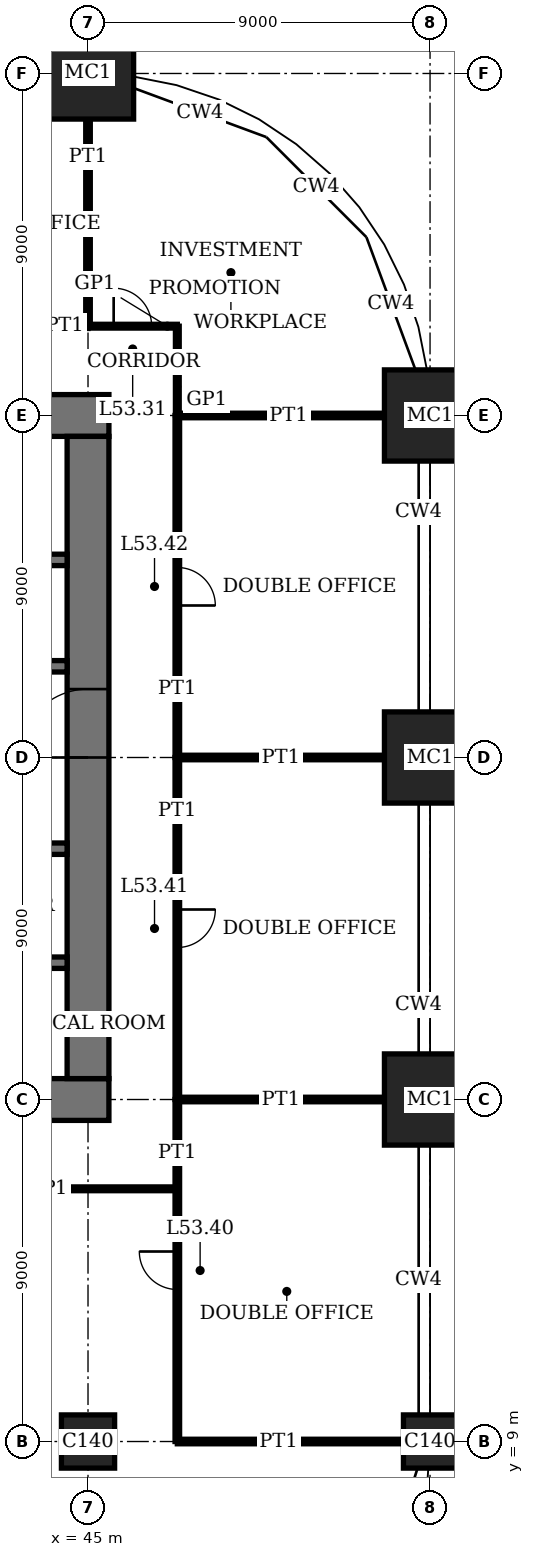
"""IFC4 building model, lengths in metres.
Left out: names, types, materials, properties, quantities, classifications, styles, units other than length and angle.
Written with IfcOpenShell. Run it as: python <this file> out.ifc"""

import sys

from ifc_helpers import new_model, si_unit, direction, frame, frame_2d, origin, origin_2d, place, context, subcontext, project, spatial, rectangle, extrude, element, fill, save


model = new_model("IFC4")
c1 = context("Model", 3, precision=1e-05, world=origin(), true_north=direction((0.0, 1.0)))
c2 = subcontext(c1, "Body", "Model", "MODEL_VIEW")
j1 = project(units=[si_unit("LENGTHUNIT", "METRE"), si_unit("PLANEANGLEUNIT", "RADIAN")], contexts=[c1])
p1 = place(None, origin())
s1 = spatial("IfcSite", under=j1, at=p1, CompositionType="ELEMENT")
p2 = place(p1, origin())
s2 = spatial("IfcBuilding", under=s1, at=p2, CompositionType="ELEMENT")
p3 = place(p2, frame((0.0, 0.0, 218.2)))
s3 = spatial("IfcBuildingStorey", under=s2, at=p3, CompositionType="ELEMENT", Elevation=218.2)
p4 = place(p3, frame((45.0, 9.0, 0.0), z_axis=(0.0, 0.0, 1.0), x_axis=(1.0, 0.0, 0.0)))
e1 = element("IfcColumn", 1, at=p4, inside=s3, PredefinedType="COLUMN", context=c2, shape_type="SweptSolid", body=[
    extrude(rectangle(XDim=1.4, YDim=1.4, at=origin_2d()), origin(), (0.0, 0.0, 1.0), 4.0),
])
p5 = place(p3, frame((45.0, 45.0, 0.0), z_axis=(0.0, 0.0, 1.0), x_axis=(1.0, 0.0, 0.0)))
e2 = element("IfcColumn", 2, at=p5, inside=s3, PredefinedType="COLUMN", context=c2, shape_type="SweptSolid", body=[
    extrude(rectangle(XDim=2.4, YDim=2.4, at=origin_2d()), origin(), (0.0, 0.0, 1.0), 4.0),
])
p6 = place(p3, frame((54.0, 9.0, 0.0), z_axis=(0.0, 0.0, 1.0), x_axis=(1.0, 0.0, 0.0)))
e3 = element("IfcColumn", 3, at=p6, inside=s3, PredefinedType="COLUMN", context=c2, shape_type="SweptSolid", body=[
    extrude(rectangle(XDim=1.4, YDim=1.4, at=origin_2d()), origin(), (0.0, 0.0, 1.0), 4.0),
])
for number, where, z_axis, x_axis in (
    (4, (54.0, 18.0, 0.0), (0.0, 0.0, 1.0), (1.0, 0.0, 0.0)),
    (5, (54.0, 27.0, 0.0), (0.0, 0.0, 1.0), (1.0, 0.0, 0.0)),
    (6, (54.0, 36.0, 0.0), (0.0, 0.0, 1.0), (1.0, 0.0, 0.0)),
):
    element("IfcColumn", number, at=place(p3, frame(where, z_axis=z_axis, x_axis=x_axis)), inside=s3, PredefinedType="COLUMN", context=c2, shape_type="SweptSolid", body=[
        extrude(rectangle(XDim=2.4, YDim=2.4, at=origin_2d()), origin(), (0.0, 0.0, 1.0), 4.0),
    ])
p7 = place(p3, frame((17.45, 18.0, 0.0), z_axis=(0.0, 0.0, 1.0), x_axis=(1.0, 0.0, 0.0)))
e7 = element("IfcWall", 7, at=p7, inside=s3, PredefinedType="SHEAR", context=c2, shape_type="SweptSolid", body=[
    extrude(rectangle(XDim=28.1, YDim=1.1, at=frame_2d((14.05, 0.0))), origin(), (0.0, 0.0, 1.0), 4.0),
])
p8 = place(p7, frame((11.55, 0.0, 0.0)))
e8 = element("IfcOpeningElement", 8, at=p8, cuts=e7, PredefinedType="OPENING", context=c2, shape_type="SweptSolid", body=[
    extrude(rectangle(XDim=1.0, YDim=2.4, at=frame_2d((0.5, 1.2))), frame((0.0, 0.56, 0.0), z_axis=(0.0, -1.0, 0.0), x_axis=(1.0, 0.0, 0.0)), (0.0, 0.0, 1.0), 1.12),
])
p9 = place(p7, frame((16.55, 0.0, 0.0)))
e9 = element("IfcOpeningElement", 9, at=p9, cuts=e7, PredefinedType="OPENING", context=c2, shape_type="SweptSolid", body=[
    extrude(rectangle(XDim=1.0, YDim=2.4, at=frame_2d((0.5, 1.2))), frame((0.0, 0.56, 0.0), z_axis=(0.0, -1.0, 0.0), x_axis=(1.0, 0.0, 0.0)), (0.0, 0.0, 1.0), 1.12),
])
p10 = place(p7, frame((20.0, 0.0, 0.0)))
e10 = element("IfcOpeningElement", 10, at=p10, cuts=e7, PredefinedType="OPENING", context=c2, shape_type="SweptSolid", body=[
    extrude(rectangle(XDim=1.1, YDim=2.4, at=frame_2d((0.55, 1.2))), frame((0.0, 0.56, 0.0), z_axis=(0.0, -1.0, 0.0), x_axis=(1.0, 0.0, 0.0)), (0.0, 0.0, 1.0), 1.12),
])
p11 = place(p7, frame((24.05, 0.0, 0.0)))
e11 = element("IfcOpeningElement", 11, at=p11, cuts=e7, PredefinedType="OPENING", context=c2, shape_type="SweptSolid", body=[
    extrude(rectangle(XDim=1.0, YDim=2.4, at=frame_2d((0.5, 1.2))), frame((0.0, 0.56, 0.0), z_axis=(0.0, -1.0, 0.0), x_axis=(1.0, 0.0, 0.0)), (0.0, 0.0, 1.0), 1.12),
])
p12 = place(p3, frame((45.55, 36.0, 0.0), z_axis=(0.0, 0.0, 1.0), x_axis=(-1.0, 0.0, 0.0)))
e12 = element("IfcWall", 12, at=p12, inside=s3, PredefinedType="SHEAR", context=c2, shape_type="SweptSolid", body=[
    extrude(rectangle(XDim=28.1, YDim=1.1, at=frame_2d((14.05, 0.0))), origin(), (0.0, 0.0, 1.0), 4.0),
])
p13 = place(p12, frame((11.55, 0.0, 0.0)))
e13 = element("IfcOpeningElement", 13, at=p13, cuts=e12, PredefinedType="OPENING", context=c2, shape_type="SweptSolid", body=[
    extrude(rectangle(XDim=1.0, YDim=2.4, at=frame_2d((0.5, 1.2))), frame((0.0, 0.56, 0.0), z_axis=(0.0, -1.0, 0.0), x_axis=(1.0, 0.0, 0.0)), (0.0, 0.0, 1.0), 1.12),
])
p14 = place(p12, frame((16.55, 0.0, 0.0)))
e14 = element("IfcOpeningElement", 14, at=p14, cuts=e12, PredefinedType="OPENING", context=c2, shape_type="SweptSolid", body=[
    extrude(rectangle(XDim=1.0, YDim=2.4, at=frame_2d((0.5, 1.2))), frame((0.0, 0.56, 0.0), z_axis=(0.0, -1.0, 0.0), x_axis=(1.0, 0.0, 0.0)), (0.0, 0.0, 1.0), 1.12),
])
p15 = place(p12, frame((20.0, 0.0, 0.0)))
e15 = element("IfcOpeningElement", 15, at=p15, cuts=e12, PredefinedType="OPENING", context=c2, shape_type="SweptSolid", body=[
    extrude(rectangle(XDim=1.1, YDim=2.4, at=frame_2d((0.55, 1.2))), frame((0.0, 0.56, 0.0), z_axis=(0.0, -1.0, 0.0), x_axis=(1.0, 0.0, 0.0)), (0.0, 0.0, 1.0), 1.12),
])
p16 = place(p12, frame((24.05, 0.0, 0.0)))
e16 = element("IfcOpeningElement", 16, at=p16, cuts=e12, PredefinedType="OPENING", context=c2, shape_type="SweptSolid", body=[
    extrude(rectangle(XDim=1.0, YDim=2.4, at=frame_2d((0.5, 1.2))), frame((0.0, 0.56, 0.0), z_axis=(0.0, -1.0, 0.0), x_axis=(1.0, 0.0, 0.0)), (0.0, 0.0, 1.0), 1.12),
])
p17 = place(p3, frame((45.0, 18.55, 0.0), z_axis=(0.0, 0.0, 1.0), x_axis=(0.0, 1.0, 0.0)))
e17 = element("IfcWall", 17, at=p17, inside=s3, PredefinedType="SHEAR", context=c2, shape_type="SweptSolid", body=[
    extrude(rectangle(XDim=16.9, YDim=1.1, at=frame_2d((8.45, 0.0))), origin(), (0.0, 0.0, 1.0), 4.0),
])
p18 = place(p17, frame((8.45, 0.0, 0.0)))
e18 = element("IfcOpeningElement", 18, at=p18, cuts=e17, PredefinedType="OPENING", context=c2, shape_type="SweptSolid", body=[
    extrude(rectangle(XDim=1.8, YDim=2.4, at=frame_2d((0.9, 1.2))), frame((0.0, 0.56, 0.0), z_axis=(0.0, -1.0, 0.0), x_axis=(1.0, 0.0, 0.0)), (0.0, 0.0, 1.0), 1.12),
])
p19 = place(p3, frame((36.15, 32.2, 0.0), z_axis=(0.0, 0.0, 1.0), x_axis=(1.0, 0.0, 0.0)))
e19 = element("IfcWall", 19, at=p19, inside=s3, PredefinedType="SHEAR", context=c2, shape_type="SweptSolid", body=[
    extrude(rectangle(XDim=8.3, YDim=0.3, at=frame_2d((4.15, 0.0))), origin(), (0.0, 0.0, 1.0), 4.0),
])
p20 = place(p19, frame((0.45, 0.0, 0.0)))
e20 = element("IfcOpeningElement", 20, at=p20, cuts=e19, PredefinedType="OPENING", context=c2, shape_type="SweptSolid", body=[
    extrude(rectangle(XDim=1.0, YDim=2.4, at=frame_2d((0.5, 1.2))), frame((0.0, 0.16, 0.0), z_axis=(0.0, -1.0, 0.0), x_axis=(1.0, 0.0, 0.0)), (0.0, 0.0, 1.0), 0.32),
])
p21 = place(p3, frame((18.55, 24.6, 0.0), z_axis=(0.0, 0.0, 1.0), x_axis=(1.0, 0.0, 0.0)))
e21 = element("IfcWall", 21, at=p21, inside=s3, PredefinedType="SHEAR", context=c2, shape_type="SweptSolid", body=[
    extrude(rectangle(XDim=25.9, YDim=0.3, at=frame_2d((12.95, 0.0))), origin(), (0.0, 0.0, 1.0), 4.0),
])
p22 = place(p21, frame((4.95, 0.0, 0.0)))
e22 = element("IfcOpeningElement", 22, at=p22, cuts=e21, PredefinedType="OPENING", context=c2, shape_type="SweptSolid", body=[
    extrude(rectangle(XDim=1.0, YDim=2.4, at=frame_2d((0.5, 1.2))), frame((0.0, 0.16, 0.0), z_axis=(0.0, -1.0, 0.0), x_axis=(1.0, 0.0, 0.0)), (0.0, 0.0, 1.0), 0.32),
])
p23 = place(p21, frame((24.5, 0.0, 0.0)))
e23 = element("IfcOpeningElement", 23, at=p23, cuts=e21, PredefinedType="OPENING", context=c2, shape_type="SweptSolid", body=[
    extrude(rectangle(XDim=0.9, YDim=2.1, at=frame_2d((0.45, 1.05))), frame((0.0, 0.16, 0.0), z_axis=(0.0, -1.0, 0.0), x_axis=(1.0, 0.0, 0.0)), (0.0, 0.0, 1.0), 0.32),
])
p24 = place(p21, frame((21.3, 0.0, 0.0)))
e24 = element("IfcOpeningElement", 24, at=p24, cuts=e21, PredefinedType="OPENING", context=c2, shape_type="SweptSolid", body=[
    extrude(rectangle(XDim=1.3, YDim=2.4, at=frame_2d((0.65, 1.2))), frame((0.0, 0.16, 0.0), z_axis=(0.0, -1.0, 0.0), x_axis=(1.0, 0.0, 0.0)), (0.0, 0.0, 1.0), 0.32),
])
p25 = place(p3, frame((18.55, 29.4, 0.0), z_axis=(0.0, 0.0, 1.0), x_axis=(1.0, 0.0, 0.0)))
e25 = element("IfcWall", 25, at=p25, inside=s3, PredefinedType="SHEAR", context=c2, shape_type="SweptSolid", body=[
    extrude(rectangle(XDim=25.9, YDim=0.3, at=frame_2d((12.95, 0.0))), origin(), (0.0, 0.0, 1.0), 4.0),
])
p26 = place(p25, frame((19.95, 0.0, 0.0)))
e26 = element("IfcOpeningElement", 26, at=p26, cuts=e25, PredefinedType="OPENING", context=c2, shape_type="SweptSolid", body=[
    extrude(rectangle(XDim=1.0, YDim=2.4, at=frame_2d((0.5, 1.2))), frame((0.0, 0.16, 0.0), z_axis=(0.0, -1.0, 0.0), x_axis=(1.0, 0.0, 0.0)), (0.0, 0.0, 1.0), 0.32),
])
p27 = place(p25, frame((0.5, 0.0, 0.0)))
e27 = element("IfcOpeningElement", 27, at=p27, cuts=e25, PredefinedType="OPENING", context=c2, shape_type="SweptSolid", body=[
    extrude(rectangle(XDim=0.9, YDim=2.1, at=frame_2d((0.45, 1.05))), frame((0.0, 0.16, 0.0), z_axis=(0.0, -1.0, 0.0), x_axis=(1.0, 0.0, 0.0)), (0.0, 0.0, 1.0), 0.32),
])
p28 = place(p25, frame((15.45, 0.0, 0.0)))
e28 = element("IfcOpeningElement", 28, at=p28, cuts=e25, PredefinedType="OPENING", context=c2, shape_type="SweptSolid", body=[
    extrude(rectangle(XDim=1.0, YDim=2.4, at=frame_2d((0.5, 1.2))), frame((0.0, 0.16, 0.0), z_axis=(0.0, -1.0, 0.0), x_axis=(1.0, 0.0, 0.0)), (0.0, 0.0, 1.0), 0.32),
])
p29 = place(p25, frame((12.45, 0.0, 0.0)))
e29 = element("IfcOpeningElement", 29, at=p29, cuts=e25, PredefinedType="OPENING", context=c2, shape_type="SweptSolid", body=[
    extrude(rectangle(XDim=1.0, YDim=2.4, at=frame_2d((0.5, 1.2))), frame((0.0, 0.16, 0.0), z_axis=(0.0, -1.0, 0.0), x_axis=(1.0, 0.0, 0.0)), (0.0, 0.0, 1.0), 0.32),
])
p30 = place(p25, frame((9.4, 0.0, 0.0)))
e30 = element("IfcOpeningElement", 30, at=p30, cuts=e25, PredefinedType="OPENING", context=c2, shape_type="SweptSolid", body=[
    extrude(rectangle(XDim=1.1, YDim=2.4, at=frame_2d((0.55, 1.2))), frame((0.0, 0.16, 0.0), z_axis=(0.0, -1.0, 0.0), x_axis=(1.0, 0.0, 0.0)), (0.0, 0.0, 1.0), 0.32),
])
p31 = place(p25, frame((6.4, 0.0, 0.0)))
e31 = element("IfcOpeningElement", 31, at=p31, cuts=e25, PredefinedType="OPENING", context=c2, shape_type="SweptSolid", body=[
    extrude(rectangle(XDim=1.1, YDim=2.4, at=frame_2d((0.55, 1.2))), frame((0.0, 0.16, 0.0), z_axis=(0.0, -1.0, 0.0), x_axis=(1.0, 0.0, 0.0)), (0.0, 0.0, 1.0), 0.32),
])
p32 = place(p25, frame((3.3, 0.0, 0.0)))
e32 = element("IfcOpeningElement", 32, at=p32, cuts=e25, PredefinedType="OPENING", context=c2, shape_type="SweptSolid", body=[
    extrude(rectangle(XDim=1.3, YDim=2.4, at=frame_2d((0.65, 1.2))), frame((0.0, 0.16, 0.0), z_axis=(0.0, -1.0, 0.0), x_axis=(1.0, 0.0, 0.0)), (0.0, 0.0, 1.0), 0.32),
])
p33 = place(p3, frame((27.15, 21.6, 0.0), z_axis=(0.0, 0.0, 1.0), x_axis=(1.0, 0.0, 0.0)))
e33 = element("IfcWall", 33, at=p33, inside=s3, PredefinedType="SHEAR", context=c2, shape_type="SweptSolid", body=[
    extrude(rectangle(XDim=17.3, YDim=0.3, at=frame_2d((8.65, 0.0))), origin(), (0.0, 0.0, 1.0), 4.0),
])
p34 = place(p3, frame((47.35, 9.0, 0.0), z_axis=(0.0, 0.0, 1.0), x_axis=(1.0, 0.0, 0.0)))
e34 = element("IfcWall", 34, at=p34, inside=s3, PredefinedType="PARTITIONING", context=c2, shape_type="SweptSolid", body=[
    extrude(rectangle(XDim=5.95, YDim=0.12, at=frame_2d((2.975, 0.0))), origin(), (0.0, 0.0, 1.0), 3.05),
])
p35 = place(p3, frame((40.5, 15.65, 0.0), z_axis=(0.0, 0.0, 1.0), x_axis=(1.0, 0.0, 0.0)))
e35 = element("IfcWall", 35, at=p35, inside=s3, PredefinedType="PARTITIONING", context=c2, shape_type="SweptSolid", body=[
    extrude(rectangle(XDim=6.85, YDim=0.1, at=frame_2d((3.425, 0.0))), origin(), (0.0, 0.0, 1.0), 3.75),
])
for number, where, z_axis, x_axis in (
    (36, (47.35, 18.0, 0.0), (0.0, 0.0, 1.0), (1.0, 0.0, 0.0)),
    (37, (47.35, 27.0, 0.0), (0.0, 0.0, 1.0), (1.0, 0.0, 0.0)),
    (38, (47.35, 36.0, 0.0), (0.0, 0.0, 1.0), (1.0, 0.0, 0.0)),
):
    element("IfcWall", number, at=place(p3, frame(where, z_axis=z_axis, x_axis=x_axis)), inside=s3, PredefinedType="PARTITIONING", context=c2, shape_type="SweptSolid", body=[
        extrude(rectangle(XDim=5.45, YDim=0.12, at=frame_2d((2.725, 0.0))), origin(), (0.0, 0.0, 1.0), 3.05),
    ])
p36 = place(p3, frame((40.5, 38.35, 0.0), z_axis=(0.0, 0.0, 1.0), x_axis=(1.0, 0.0, 0.0)))
e39 = element("IfcWall", 39, at=p36, inside=s3, PredefinedType="PARTITIONING", context=c2, shape_type="SweptSolid", body=[
    extrude(rectangle(XDim=4.5, YDim=0.12, at=frame_2d((2.25, 0.0))), origin(), (0.0, 0.0, 1.0), 3.75),
])
p37 = place(p36, frame((1.75, 0.0, 0.0)))
e40 = element("IfcOpeningElement", 40, at=p37, cuts=e39, PredefinedType="OPENING", context=c2, shape_type="SweptSolid", body=[
    extrude(rectangle(XDim=1.0, YDim=2.4, at=frame_2d((0.5, 1.2))), frame((0.0, 0.07, 0.0), z_axis=(0.0, -1.0, 0.0), x_axis=(1.0, 0.0, 0.0)), (0.0, 0.0, 1.0), 0.14),
])
p38 = place(p3, frame((45.0, 38.35, 0.0), z_axis=(0.0, 0.0, 1.0), x_axis=(1.0, 0.0, 0.0)))
e41 = element("IfcWall", 41, at=p38, inside=s3, PredefinedType="PARTITIONING", context=c2, shape_type="SweptSolid", body=[
    extrude(rectangle(XDim=2.35, YDim=0.1, at=frame_2d((1.175, 0.0))), origin(), (0.0, 0.0, 1.0), 3.75),
])
p39 = place(p38, frame((0.675, 0.0, 0.0)))
e42 = element("IfcOpeningElement", 42, at=p39, cuts=e41, PredefinedType="OPENING", context=c2, shape_type="SweptSolid", body=[
    extrude(rectangle(XDim=1.0, YDim=2.4, at=frame_2d((0.5, 1.2))), frame((0.0, 0.06, 0.0), z_axis=(0.0, -1.0, 0.0), x_axis=(1.0, 0.0, 0.0)), (0.0, 0.0, 1.0), 0.12),
])
p40 = place(p3, frame((45.0, 38.35, 0.0), z_axis=(0.0, 0.0, 1.0), x_axis=(0.0, 1.0, 0.0)))
e43 = element("IfcWall", 43, at=p40, inside=s3, PredefinedType="PARTITIONING", context=c2, shape_type="SweptSolid", body=[
    extrude(rectangle(XDim=5.45, YDim=0.12, at=frame_2d((2.725, 0.0))), origin(), (0.0, 0.0, 1.0), 3.05),
])
p41 = place(p3, frame((47.35, 9.0, 0.0), z_axis=(0.0, 0.0, 1.0), x_axis=(0.0, 1.0, 0.0)))
e44 = element("IfcWall", 44, at=p41, inside=s3, PredefinedType="PARTITIONING", context=c2, shape_type="SweptSolid", body=[
    extrude(rectangle(XDim=9.0, YDim=0.12, at=frame_2d((4.5, 0.0))), origin(), (0.0, 0.0, 1.0), 3.75),
])
p42 = place(p41, frame((4.0, 0.0, 0.0)))
e45 = element("IfcOpeningElement", 45, at=p42, cuts=e44, PredefinedType="OPENING", context=c2, shape_type="SweptSolid", body=[
    extrude(rectangle(XDim=1.0, YDim=2.4, at=frame_2d((0.5, 1.2))), frame((0.0, 0.07, 0.0), z_axis=(0.0, -1.0, 0.0), x_axis=(1.0, 0.0, 0.0)), (0.0, 0.0, 1.0), 0.14),
])
p43 = place(p3, frame((47.35, 18.0, 0.0), z_axis=(0.0, 0.0, 1.0), x_axis=(0.0, 1.0, 0.0)))
e46 = element("IfcWall", 46, at=p43, inside=s3, PredefinedType="PARTITIONING", context=c2, shape_type="SweptSolid", body=[
    extrude(rectangle(XDim=9.0, YDim=0.12, at=frame_2d((4.5, 0.0))), origin(), (0.0, 0.0, 1.0), 3.75),
])
p44 = place(p43, frame((4.0, 0.0, 0.0)))
e47 = element("IfcOpeningElement", 47, at=p44, cuts=e46, PredefinedType="OPENING", context=c2, shape_type="SweptSolid", body=[
    extrude(rectangle(XDim=1.0, YDim=2.4, at=frame_2d((0.5, 1.2))), frame((0.0, 0.07, 0.0), z_axis=(0.0, -1.0, 0.0), x_axis=(1.0, 0.0, 0.0)), (0.0, 0.0, 1.0), 0.14),
])
p45 = place(p3, frame((47.35, 27.0, 0.0), z_axis=(0.0, 0.0, 1.0), x_axis=(0.0, 1.0, 0.0)))
e48 = element("IfcWall", 48, at=p45, inside=s3, PredefinedType="PARTITIONING", context=c2, shape_type="SweptSolid", body=[
    extrude(rectangle(XDim=9.0, YDim=0.12, at=frame_2d((4.5, 0.0))), origin(), (0.0, 0.0, 1.0), 3.75),
])
p46 = place(p45, frame((4.0, 0.0, 0.0)))
e49 = element("IfcOpeningElement", 49, at=p46, cuts=e48, PredefinedType="OPENING", context=c2, shape_type="SweptSolid", body=[
    extrude(rectangle(XDim=1.0, YDim=2.4, at=frame_2d((0.5, 1.2))), frame((0.0, 0.07, 0.0), z_axis=(0.0, -1.0, 0.0), x_axis=(1.0, 0.0, 0.0)), (0.0, 0.0, 1.0), 0.14),
])
p47 = place(p3, frame((47.35, 36.0, 0.0), z_axis=(0.0, 0.0, 1.0), x_axis=(0.0, 1.0, 0.0)))
e50 = element("IfcWall", 50, at=p47, inside=s3, PredefinedType="PARTITIONING", context=c2, shape_type="SweptSolid", body=[
    extrude(rectangle(XDim=2.35, YDim=0.1, at=frame_2d((1.175, 0.0))), origin(), (0.0, 0.0, 1.0), 3.75),
])
p48 = place(p18, origin())
e51 = element("IfcDoor", 51, at=p48, inside=s3, OperationType="DOUBLE_DOOR_DOUBLE_SWING", PredefinedType="DOOR", context=c2, shape_type="SweptSolid", body=[
    extrude(rectangle(XDim=1.8, YDim=2.4, at=frame_2d((0.9, 1.2))), frame((0.0, 0.03, 0.0), z_axis=(0.0, -1.0, 0.0), x_axis=(1.0, 0.0, 0.0)), (0.0, 0.0, 1.0), 0.06),
    extrude(rectangle(XDim=0.04, YDim=2.4, at=frame_2d((0.02, 1.2))), frame((0.0, 0.55, 0.0), z_axis=(0.0, -1.0, 0.0), x_axis=(1.0, 0.0, 0.0)), (0.0, 0.0, 1.0), 1.1),
    extrude(rectangle(XDim=0.04, YDim=2.4, at=frame_2d((1.78, 1.2))), frame((0.0, 0.55, 0.0), z_axis=(0.0, -1.0, 0.0), x_axis=(1.0, 0.0, 0.0)), (0.0, 0.0, 1.0), 1.1),
    extrude(rectangle(XDim=1.8, YDim=0.04, at=frame_2d((0.9, 2.38))), frame((0.0, 0.55, 0.0), z_axis=(0.0, -1.0, 0.0), x_axis=(1.0, 0.0, 0.0)), (0.0, 0.0, 1.0), 1.1),
])
fill(e18, e51)
p49 = place(p39, origin())
e52 = element("IfcDoor", 52, at=p49, inside=s3, OperationType="SINGLE_SWING_RIGHT", PredefinedType="DOOR", context=c2, shape_type="SweptSolid", body=[
    extrude(rectangle(XDim=1.0, YDim=2.4, at=frame_2d((0.5, 1.2))), frame((0.0, 0.02, 0.0), z_axis=(0.0, -1.0, 0.0), x_axis=(1.0, 0.0, 0.0)), (0.0, 0.0, 1.0), 0.04),
])
fill(e42, e52)
p50 = place(p42, origin())
e53 = element("IfcDoor", 53, at=p50, inside=s3, OperationType="SINGLE_SWING_LEFT", PredefinedType="DOOR", context=c2, shape_type="SweptSolid", body=[
    extrude(rectangle(XDim=1.0, YDim=2.4, at=frame_2d((0.5, 1.2))), frame((0.0, 0.025, 0.0), z_axis=(0.0, -1.0, 0.0), x_axis=(1.0, 0.0, 0.0)), (0.0, 0.0, 1.0), 0.05),
])
fill(e45, e53)
p51 = place(p44, origin())
e54 = element("IfcDoor", 54, at=p51, inside=s3, OperationType="SINGLE_SWING_RIGHT", PredefinedType="DOOR", context=c2, shape_type="SweptSolid", body=[
    extrude(rectangle(XDim=1.0, YDim=2.4, at=frame_2d((0.5, 1.2))), frame((0.0, 0.025, 0.0), z_axis=(0.0, -1.0, 0.0), x_axis=(1.0, 0.0, 0.0)), (0.0, 0.0, 1.0), 0.05),
])
fill(e47, e54)
p52 = place(p46, origin())
e55 = element("IfcDoor", 55, at=p52, inside=s3, OperationType="SINGLE_SWING_LEFT", PredefinedType="DOOR", context=c2, shape_type="SweptSolid", body=[
    extrude(rectangle(XDim=1.0, YDim=2.4, at=frame_2d((0.5, 1.2))), frame((0.0, 0.025, 0.0), z_axis=(0.0, -1.0, 0.0), x_axis=(1.0, 0.0, 0.0)), (0.0, 0.0, 1.0), 0.05),
])
fill(e49, e55)
save(model, sys.argv[1])
